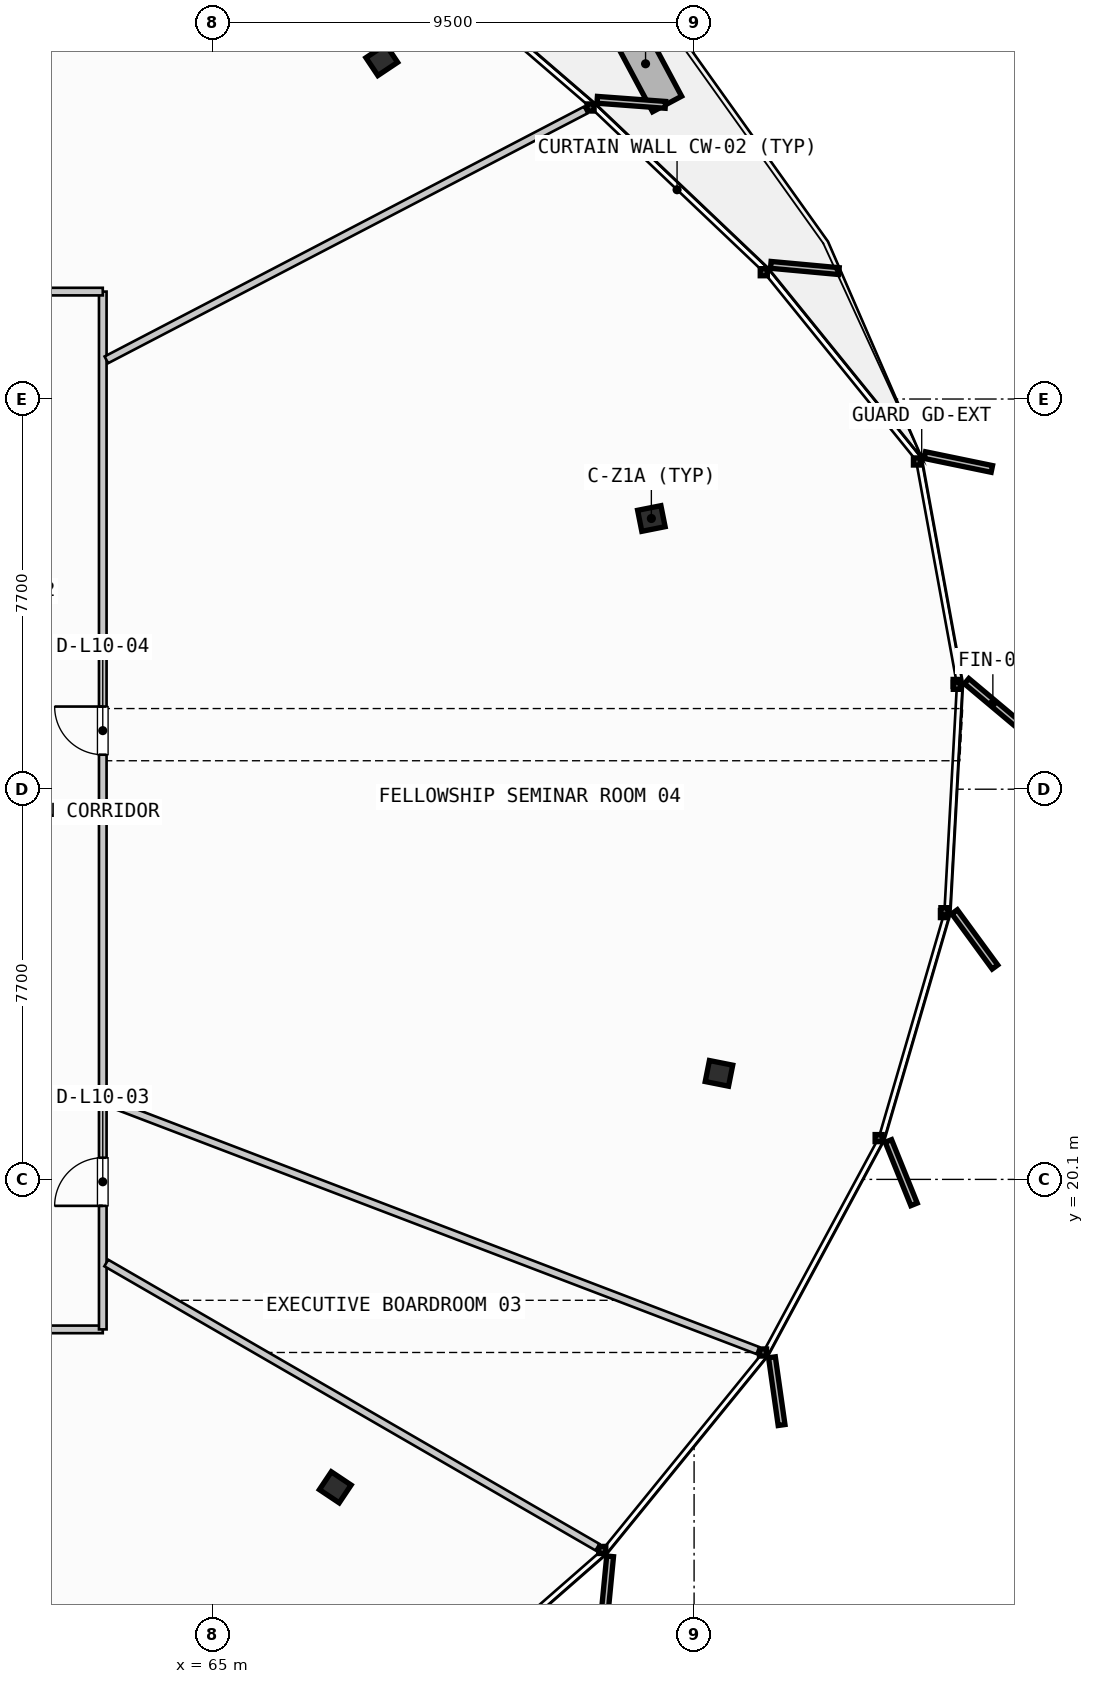
"""IFC4 building model, lengths in metres.
Left out: names, types, materials, properties, quantities, classifications, styles, units other than length and angle.
Written with IfcOpenShell. Run it as: python <this file> out.ifc"""

import sys

from ifc_helpers import new_model, si_unit, direction, frame, frame_2d, origin, origin_2d, place, context, subcontext, project, spatial, rectangle, i_section, extrude, source, transform, mapped, element, fill, save


model = new_model("IFC4")
c1 = context("Model", 3, precision=1e-05, world=origin(), true_north=direction((0.0, 1.0)))
c2 = subcontext(c1, "Body", "Model", "MODEL_VIEW")
j1 = project(units=[si_unit("LENGTHUNIT", "METRE"), si_unit("PLANEANGLEUNIT", "RADIAN")], contexts=[c1])
p1 = place(None, origin())
s1 = spatial("IfcSite", under=j1, at=p1, CompositionType="ELEMENT")
p2 = place(p1, origin())
s2 = spatial("IfcBuilding", under=s1, at=p2, CompositionType="ELEMENT")
p3 = place(p2, frame((0.0, 0.0, 44.8)))
s3 = spatial("IfcBuildingStorey", under=s2, at=p3, CompositionType="ELEMENT", Elevation=44.8)
m1 = source(origin(), c2, "Body", "SweptSolid", [
    extrude(i_section(OverallWidth=0.423, OverallDepth=0.469, WebThickness=0.051, FlangeThickness=0.081, FilletRadius=0.015, at=origin_2d()), origin(), (0.0, 0.0, 1.0), 3.55),
])
for number, where, z_axis, x_axis in (
    (1, (73.657, 33.142, 0.0), (0.0, 0.0, 1.0), (0.981, 0.195, 0.0)),
    (2, (68.336, 42.19, 0.0), (0.0, 0.0, 1.0), (0.831, 0.556, 0.0)),
    (3, (67.418, 14.023, 0.0), (0.0, 0.0, 1.0), (0.831, -0.556, 0.0)),
    (4, (74.991, 22.192, 0.0), (0.0, 0.0, 1.0), (0.981, -0.195, 0.0)),
):
    element("IfcColumn", number, at=place(p3, frame(where, z_axis=z_axis, x_axis=x_axis)), inside=s3, PredefinedType="COLUMN", context=c2, shape_type="MappedRepresentation", body=[
        mapped(m1, transform((0.0, 0.0, 0.0), scale=1.0)),
    ])
p4 = place(p3, frame((32.33, 17.14, 0.0), z_axis=(0.0, 0.0, 1.0), x_axis=(1.0, 0.0, 0.0)))
e5 = element("IfcWall", 5, at=p4, inside=s3, PredefinedType="PARTITIONING", context=c2, shape_type="SweptSolid", body=[
    extrude(rectangle(XDim=30.5, YDim=0.15, at=frame_2d((15.25, 0.0))), origin(), (0.0, 0.0, 1.0), 2.785),
])
p5 = place(p4, frame((6.316, 0.0, 0.0)))
e6 = element("IfcOpeningElement", 6, at=p5, cuts=e5, PredefinedType="OPENING", context=c2, shape_type="SweptSolid", body=[
    extrude(rectangle(XDim=0.95, YDim=2.15, at=frame_2d((0.475, 1.075))), frame((0.0, 0.085, 0.0), z_axis=(0.0, -1.0, 0.0), x_axis=(1.0, 0.0, 0.0)), (0.0, 0.0, 1.0), 0.17),
])
p6 = place(p4, frame((20.918, 0.0, 0.0)))
e7 = element("IfcOpeningElement", 7, at=p6, cuts=e5, PredefinedType="OPENING", context=c2, shape_type="SweptSolid", body=[
    extrude(rectangle(XDim=0.95, YDim=2.15, at=frame_2d((0.475, 1.075))), frame((0.0, 0.085, 0.0), z_axis=(0.0, -1.0, 0.0), x_axis=(1.0, 0.0, 0.0)), (0.0, 0.0, 1.0), 0.17),
])
p7 = place(p3, frame((62.83, 17.14, 0.0), z_axis=(0.0, 0.0, 1.0), x_axis=(0.0, 1.0, 0.0)))
e8 = element("IfcWall", 8, at=p7, inside=s3, PredefinedType="PARTITIONING", context=c2, shape_type="SweptSolid", body=[
    extrude(rectangle(XDim=20.48, YDim=0.15, at=frame_2d((10.24, 0.0))), origin(), (0.0, 0.0, 1.0), 2.785),
])
p8 = place(p7, frame((2.438, 0.0, 0.0)))
e9 = element("IfcOpeningElement", 9, at=p8, cuts=e8, PredefinedType="OPENING", context=c2, shape_type="SweptSolid", body=[
    extrude(rectangle(XDim=0.95, YDim=2.15, at=frame_2d((0.475, 1.075))), frame((0.0, 0.085, 0.0), z_axis=(0.0, -1.0, 0.0), x_axis=(1.0, 0.0, 0.0)), (0.0, 0.0, 1.0), 0.17),
])
p9 = place(p7, frame((11.341, 0.0, 0.0)))
e10 = element("IfcOpeningElement", 10, at=p9, cuts=e8, PredefinedType="OPENING", context=c2, shape_type="SweptSolid", body=[
    extrude(rectangle(XDim=0.95, YDim=2.15, at=frame_2d((0.475, 1.075))), frame((0.0, 0.085, 0.0), z_axis=(0.0, -1.0, 0.0), x_axis=(1.0, 0.0, 0.0)), (0.0, 0.0, 1.0), 0.17),
])
p10 = place(p3, frame((62.83, 37.62, 0.0), z_axis=(0.0, 0.0, 1.0), x_axis=(-1.0, 0.0, 0.0)))
e11 = element("IfcWall", 11, at=p10, inside=s3, PredefinedType="PARTITIONING", context=c2, shape_type="SweptSolid", body=[
    extrude(rectangle(XDim=30.5, YDim=0.15, at=frame_2d((15.25, 0.0))), origin(), (0.0, 0.0, 1.0), 2.785),
])
p11 = place(p10, frame((7.089, 0.0, 0.0)))
e12 = element("IfcOpeningElement", 12, at=p11, cuts=e11, PredefinedType="OPENING", context=c2, shape_type="SweptSolid", body=[
    extrude(rectangle(XDim=0.95, YDim=2.15, at=frame_2d((0.475, 1.075))), frame((0.0, 0.085, 0.0), z_axis=(0.0, -1.0, 0.0), x_axis=(1.0, 0.0, 0.0)), (0.0, 0.0, 1.0), 0.17),
])
p12 = place(p10, frame((21.758, 0.0, 0.0)))
e13 = element("IfcOpeningElement", 13, at=p12, cuts=e11, PredefinedType="OPENING", context=c2, shape_type="SweptSolid", body=[
    extrude(rectangle(XDim=0.95, YDim=2.15, at=frame_2d((0.475, 1.075))), frame((0.0, 0.085, 0.0), z_axis=(0.0, -1.0, 0.0), x_axis=(1.0, 0.0, 0.0)), (0.0, 0.0, 1.0), 0.17),
])
p13 = place(p3, frame((62.899, 18.45, 0.0), z_axis=(0.0, 0.0, 1.0), x_axis=(0.865582468035, -0.500766403656, 0.0)))
e14 = element("IfcWall", 14, at=p13, inside=s3, PredefinedType="PARTITIONING", context=c2, shape_type="SweptSolid", body=[
    extrude(rectangle(XDim=11.199, YDim=0.15, at=frame_2d((5.599, 0.0))), origin(), (0.0, 0.0, 1.0), 2.785),
])
p14 = place(p3, frame((62.905, 21.631, 0.0), z_axis=(0.0, 0.0, 1.0), x_axis=(0.934219568854, -0.356698468137, 0.0)))
e15 = element("IfcWall", 15, at=p14, inside=s3, PredefinedType="PARTITIONING", context=c2, shape_type="SweptSolid", body=[
    extrude(rectangle(XDim=13.758, YDim=0.15, at=frame_2d((6.879, 0.0))), origin(), (0.0, 0.0, 1.0), 2.785),
])
p15 = place(p3, frame((62.901, 36.273, 0.0), z_axis=(0.0, 0.0, 1.0), x_axis=(0.886802298862, 0.462148983266, 0.0)))
e16 = element("IfcWall", 16, at=p15, inside=s3, PredefinedType="PARTITIONING", context=c2, shape_type="SweptSolid", body=[
    extrude(rectangle(XDim=10.665, YDim=0.15, at=frame_2d((5.333, 0.0))), origin(), (0.0, 0.0, 1.0), 2.785),
])
m2 = source(origin(), c2, "Body", "SweptSolid", [
    extrude(rectangle(XDim=0.95, YDim=2.15, at=frame_2d((0.475, 1.075))), frame((0.0, 0.025, 0.0), z_axis=(0.0, -1.0, 0.0), x_axis=(1.0, 0.0, 0.0)), (0.0, 0.0, 1.0), 0.05),
])
p16 = place(p8, origin())
e17 = element("IfcDoor", 17, at=p16, inside=s3, OperationType="SINGLE_SWING_LEFT", PredefinedType="DOOR", context=c2, shape_type="MappedRepresentation", body=[
    mapped(m2, transform((0.0, 0.0, 0.0), scale=1.0)),
])
fill(e9, e17)
p17 = place(p9, origin())
e18 = element("IfcDoor", 18, at=p17, inside=s3, OperationType="SINGLE_SWING_RIGHT", PredefinedType="DOOR", context=c2, shape_type="MappedRepresentation", body=[
    mapped(m2, transform((0.0, 0.0, 0.0), scale=1.0)),
])
fill(e10, e18)
save(model, sys.argv[1])
